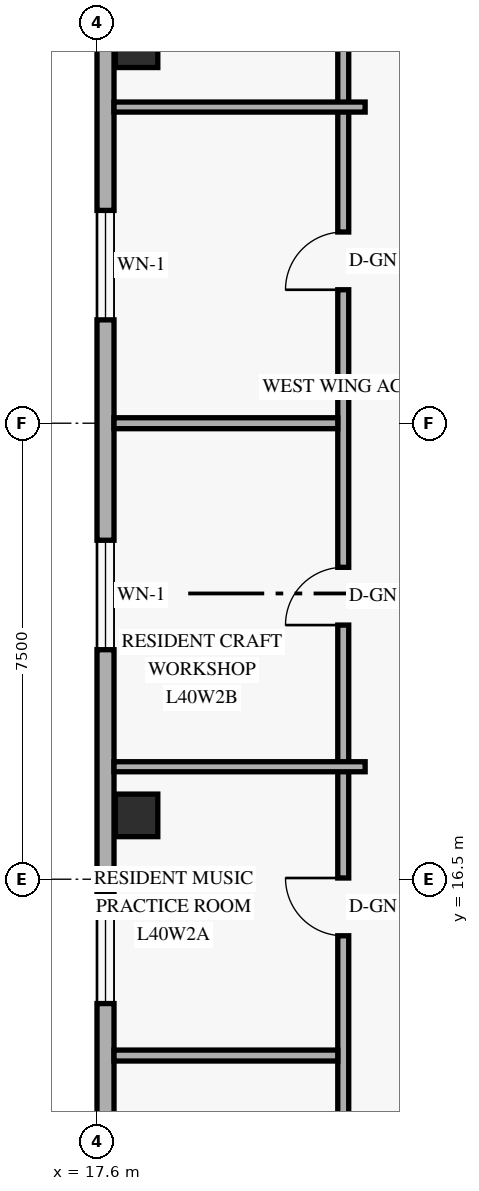
"""IFC4 building model, lengths in metres.
Left out: names, types, materials, properties, quantities, classifications, styles, units other than length and angle.
Written with IfcOpenShell. Run it as: python <this file> out.ifc"""

import sys

from ifc_helpers import new_model, si_unit, direction, frame, frame_2d, origin, origin_2d, place, context, subcontext, project, spatial, rectangle, extrude, element, fill, save


model = new_model("IFC4")
c1 = context("Model", 3, precision=1e-05, world=origin(), true_north=direction((0.0, 1.0)))
c2 = subcontext(c1, "Body", "Model", "MODEL_VIEW")
j1 = project(units=[si_unit("LENGTHUNIT", "METRE"), si_unit("PLANEANGLEUNIT", "RADIAN")], contexts=[c1])
p1 = place(None, origin())
s1 = spatial("IfcSite", under=j1, at=p1, CompositionType="ELEMENT")
p2 = place(p1, origin())
s2 = spatial("IfcBuilding", under=s1, at=p2, CompositionType="ELEMENT")
p3 = place(p2, frame((0.0, 0.0, 155.4)))
s3 = spatial("IfcBuildingStorey", under=s2, at=p3, CompositionType="ELEMENT", Elevation=155.4)
for number, where, z_axis, x_axis in (
    (1, (18.25, 17.55, 0.0), (0.0, 0.0, 1.0), (1.0, 0.0, 0.0)),
    (2, (18.25, 30.2, 0.0), (0.0, 0.0, 1.0), (1.0, 0.0, 0.0)),
):
    element("IfcColumn", number, at=place(p3, frame(where, z_axis=z_axis, x_axis=x_axis)), inside=s3, PredefinedType="COLUMN", context=c2, shape_type="SweptSolid", body=[
        extrude(rectangle(XDim=0.7, YDim=0.7, at=origin_2d()), origin(), (0.0, 0.0, 1.0), 3.6),
    ])
p4 = place(p3, frame((17.74, 40.38, 0.0), z_axis=(0.0, 0.0, 1.0), x_axis=(0.0, -1.0, 0.0)))
e3 = element("IfcWall", 3, at=p4, inside=s3, PredefinedType="SOLIDWALL", context=c2, shape_type="SweptSolid", body=[
    extrude(rectangle(XDim=32.76, YDim=0.28, at=frame_2d((16.38, 0.0))), origin(), (0.0, 0.0, 1.0), 3.36),
])
p5 = place(p4, frame((27.835, 0.0, 0.85)))
e4 = element("IfcOpeningElement", 4, at=p5, cuts=e3, PredefinedType="OPENING", context=c2, shape_type="SweptSolid", body=[
    extrude(rectangle(XDim=1.8, YDim=1.6, at=frame_2d((0.9, 0.8))), frame((0.0, 0.15, 0.0), z_axis=(0.0, -1.0, 0.0), x_axis=(1.0, 0.0, 0.0)), (0.0, 0.0, 1.0), 0.3),
])
p6 = place(p4, frame((24.125, 0.0, 0.85)))
e5 = element("IfcOpeningElement", 5, at=p6, cuts=e3, PredefinedType="OPENING", context=c2, shape_type="SweptSolid", body=[
    extrude(rectangle(XDim=1.8, YDim=1.6, at=frame_2d((0.9, 0.8))), frame((0.0, 0.15, 0.0), z_axis=(0.0, -1.0, 0.0), x_axis=(1.0, 0.0, 0.0)), (0.0, 0.0, 1.0), 0.3),
])
p7 = place(p4, frame((18.305, 0.0, 0.85)))
e6 = element("IfcOpeningElement", 6, at=p7, cuts=e3, PredefinedType="OPENING", context=c2, shape_type="SweptSolid", body=[
    extrude(rectangle(XDim=1.8, YDim=1.6, at=frame_2d((0.9, 0.8))), frame((0.0, 0.15, 0.0), z_axis=(0.0, -1.0, 0.0), x_axis=(1.0, 0.0, 0.0)), (0.0, 0.0, 1.0), 0.3),
])
p8 = place(p4, frame((12.88, 0.0, 0.85)))
e7 = element("IfcOpeningElement", 7, at=p8, cuts=e3, PredefinedType="OPENING", context=c2, shape_type="SweptSolid", body=[
    extrude(rectangle(XDim=1.8, YDim=1.6, at=frame_2d((0.9, 0.8))), frame((0.0, 0.15, 0.0), z_axis=(0.0, -1.0, 0.0), x_axis=(1.0, 0.0, 0.0)), (0.0, 0.0, 1.0), 0.3),
])
p9 = place(p4, frame((6.96, 0.0, 0.85)))
e8 = element("IfcOpeningElement", 8, at=p9, cuts=e3, PredefinedType="OPENING", context=c2, shape_type="SweptSolid", body=[
    extrude(rectangle(XDim=1.8, YDim=1.6, at=frame_2d((0.9, 0.8))), frame((0.0, 0.15, 0.0), z_axis=(0.0, -1.0, 0.0), x_axis=(1.0, 0.0, 0.0)), (0.0, 0.0, 1.0), 0.3),
])
p10 = place(p4, frame((3.125, 0.0, 0.85)))
e9 = element("IfcOpeningElement", 9, at=p10, cuts=e3, PredefinedType="OPENING", context=c2, shape_type="SweptSolid", body=[
    extrude(rectangle(XDim=1.8, YDim=1.6, at=frame_2d((0.9, 0.8))), frame((0.0, 0.15, 0.0), z_axis=(0.0, -1.0, 0.0), x_axis=(1.0, 0.0, 0.0)), (0.0, 0.0, 1.0), 0.3),
])
p11 = place(p3, frame((21.65, 6.8, 0.0), z_axis=(0.0, 0.0, 1.0), x_axis=(0.0, 1.0, 0.0)))
e10 = element("IfcWall", 10, at=p11, inside=s3, PredefinedType="STANDARD", context=c2, shape_type="SweptSolid", body=[
    extrude(rectangle(XDim=34.4, YDim=0.18, at=frame_2d((17.2, 0.0))), origin(), (0.0, 0.0, 1.0), 2.73),
])
p12 = place(p11, frame((0.3, 0.0, 0.0)))
e11 = element("IfcOpeningElement", 11, at=p12, cuts=e10, PredefinedType="OPENING", context=c2, shape_type="SweptSolid", body=[
    extrude(rectangle(XDim=0.95, YDim=2.15, at=frame_2d((0.475, 1.075))), frame((0.0, 0.1, 0.0), z_axis=(0.0, -1.0, 0.0), x_axis=(1.0, 0.0, 0.0)), (0.0, 0.0, 1.0), 0.2),
])
p13 = place(p11, frame((4.167, 0.0, 0.0)))
e12 = element("IfcOpeningElement", 12, at=p13, cuts=e10, PredefinedType="OPENING", context=c2, shape_type="SweptSolid", body=[
    extrude(rectangle(XDim=0.95, YDim=2.15, at=frame_2d((0.475, 1.075))), frame((0.0, 0.1, 0.0), z_axis=(0.0, -1.0, 0.0), x_axis=(1.0, 0.0, 0.0)), (0.0, 0.0, 1.0), 0.2),
])
p14 = place(p11, frame((8.77, 0.0, 0.0)))
e13 = element("IfcOpeningElement", 13, at=p14, cuts=e10, PredefinedType="OPENING", context=c2, shape_type="SweptSolid", body=[
    extrude(rectangle(XDim=0.95, YDim=2.15, at=frame_2d((0.475, 1.075))), frame((0.0, 0.1, 0.0), z_axis=(0.0, -1.0, 0.0), x_axis=(1.0, 0.0, 0.0)), (0.0, 0.0, 1.0), 0.2),
])
p15 = place(p11, frame((13.88, 0.0, 0.0)))
e14 = element("IfcOpeningElement", 14, at=p15, cuts=e10, PredefinedType="OPENING", context=c2, shape_type="SweptSolid", body=[
    extrude(rectangle(XDim=0.95, YDim=2.15, at=frame_2d((0.475, 1.075))), frame((0.0, 0.1, 0.0), z_axis=(0.0, -1.0, 0.0), x_axis=(1.0, 0.0, 0.0)), (0.0, 0.0, 1.0), 0.2),
])
p16 = place(p11, frame((19.395, 0.0, 0.0)))
e15 = element("IfcOpeningElement", 15, at=p16, cuts=e10, PredefinedType="OPENING", context=c2, shape_type="SweptSolid", body=[
    extrude(rectangle(XDim=0.95, YDim=2.15, at=frame_2d((0.475, 1.075))), frame((0.0, 0.1, 0.0), z_axis=(0.0, -1.0, 0.0), x_axis=(1.0, 0.0, 0.0)), (0.0, 0.0, 1.0), 0.2),
])
p17 = place(p11, frame((24.505, 0.0, 0.0)))
e16 = element("IfcOpeningElement", 16, at=p17, cuts=e10, PredefinedType="OPENING", context=c2, shape_type="SweptSolid", body=[
    extrude(rectangle(XDim=0.95, YDim=2.15, at=frame_2d((0.475, 1.075))), frame((0.0, 0.1, 0.0), z_axis=(0.0, -1.0, 0.0), x_axis=(1.0, 0.0, 0.0)), (0.0, 0.0, 1.0), 0.2),
])
p18 = place(p11, frame((29.782, 0.0, 0.0)))
e17 = element("IfcOpeningElement", 17, at=p18, cuts=e10, PredefinedType="OPENING", context=c2, shape_type="SweptSolid", body=[
    extrude(rectangle(XDim=0.95, YDim=2.15, at=frame_2d((0.475, 1.075))), frame((0.0, 0.1, 0.0), z_axis=(0.0, -1.0, 0.0), x_axis=(1.0, 0.0, 0.0)), (0.0, 0.0, 1.0), 0.2),
])
p19 = place(p11, frame((33.19, 0.0, 0.0)))
e18 = element("IfcOpeningElement", 18, at=p19, cuts=e10, PredefinedType="OPENING", context=c2, shape_type="SweptSolid", body=[
    extrude(rectangle(XDim=0.95, YDim=2.15, at=frame_2d((0.475, 1.075))), frame((0.0, 0.1, 0.0), z_axis=(0.0, -1.0, 0.0), x_axis=(1.0, 0.0, 0.0)), (0.0, 0.0, 1.0), 0.2),
])
p20 = place(p3, frame((17.88, 13.6, 0.0), z_axis=(0.0, 0.0, 1.0), x_axis=(1.0, 0.0, 0.0)))
e19 = element("IfcWall", 19, at=p20, inside=s3, PredefinedType="PARTITIONING", context=c2, shape_type="SweptSolid", body=[
    extrude(rectangle(XDim=3.68, YDim=0.18, at=frame_2d((1.84, 0.0))), origin(), (0.0, 0.0, 1.0), 2.879),
])
p21 = place(p3, frame((17.88, 18.35, 0.0), z_axis=(0.0, 0.0, 1.0), x_axis=(1.0, 0.0, 0.0)))
e20 = element("IfcWall", 20, at=p21, inside=s3, PredefinedType="PARTITIONING", context=c2, shape_type="SweptSolid", body=[
    extrude(rectangle(XDim=4.13, YDim=0.165, at=frame_2d((2.065, 0.0))), origin(), (0.0, 0.0, 1.0), 2.879),
])
p22 = place(p3, frame((17.88, 24.0, 0.0), z_axis=(0.0, 0.0, 1.0), x_axis=(1.0, 0.0, 0.0)))
e21 = element("IfcWall", 21, at=p22, inside=s3, PredefinedType="PARTITIONING", context=c2, shape_type="SweptSolid", body=[
    extrude(rectangle(XDim=3.68, YDim=0.18, at=frame_2d((1.84, 0.0))), origin(), (0.0, 0.0, 1.0), 2.879),
])
p23 = place(p3, frame((17.88, 29.2, 0.0), z_axis=(0.0, 0.0, 1.0), x_axis=(1.0, 0.0, 0.0)))
e22 = element("IfcWall", 22, at=p23, inside=s3, PredefinedType="PARTITIONING", context=c2, shape_type="SweptSolid", body=[
    extrude(rectangle(XDim=4.13, YDim=0.165, at=frame_2d((2.065, 0.0))), origin(), (0.0, 0.0, 1.0), 2.879),
])
p24 = place(p6, origin())
e23 = element("IfcWindow", 23, at=p24, inside=s3, PartitioningType="SINGLE_PANEL", PredefinedType="WINDOW", context=c2, shape_type="SweptSolid", body=[
    extrude(rectangle(XDim=1.8, YDim=1.6, at=frame_2d((0.9, 0.8))), frame((0.0, 0.03, 0.0), z_axis=(0.0, -1.0, 0.0), x_axis=(1.0, 0.0, 0.0)), (0.0, 0.0, 1.0), 0.06),
])
fill(e5, e23)
p25 = place(p7, origin())
e24 = element("IfcWindow", 24, at=p25, inside=s3, PartitioningType="SINGLE_PANEL", PredefinedType="WINDOW", context=c2, shape_type="SweptSolid", body=[
    extrude(rectangle(XDim=1.8, YDim=1.6, at=frame_2d((0.9, 0.8))), frame((0.0, 0.03, 0.0), z_axis=(0.0, -1.0, 0.0), x_axis=(1.0, 0.0, 0.0)), (0.0, 0.0, 1.0), 0.06),
])
fill(e6, e24)
p26 = place(p8, origin())
e25 = element("IfcWindow", 25, at=p26, inside=s3, PartitioningType="SINGLE_PANEL", PredefinedType="WINDOW", context=c2, shape_type="SweptSolid", body=[
    extrude(rectangle(XDim=1.8, YDim=1.6, at=frame_2d((0.9, 0.8))), frame((0.0, 0.03, 0.0), z_axis=(0.0, -1.0, 0.0), x_axis=(1.0, 0.0, 0.0)), (0.0, 0.0, 1.0), 0.06),
])
fill(e7, e25)
p27 = place(p14, origin())
e26 = element("IfcDoor", 26, at=p27, inside=s3, OperationType="SINGLE_SWING_RIGHT", PredefinedType="DOOR", context=c2, shape_type="SweptSolid", body=[
    extrude(rectangle(XDim=0.95, YDim=2.15, at=frame_2d((0.475, 1.075))), frame((0.0, 0.025, 0.0), z_axis=(0.0, -1.0, 0.0), x_axis=(1.0, 0.0, 0.0)), (0.0, 0.0, 1.0), 0.05),
])
fill(e13, e26)
p28 = place(p15, origin())
e27 = element("IfcDoor", 27, at=p28, inside=s3, OperationType="SINGLE_SWING_LEFT", PredefinedType="DOOR", context=c2, shape_type="SweptSolid", body=[
    extrude(rectangle(XDim=0.95, YDim=2.15, at=frame_2d((0.475, 1.075))), frame((0.0, 0.025, 0.0), z_axis=(0.0, -1.0, 0.0), x_axis=(1.0, 0.0, 0.0)), (0.0, 0.0, 1.0), 0.05),
])
fill(e14, e27)
p29 = place(p16, origin())
e28 = element("IfcDoor", 28, at=p29, inside=s3, OperationType="SINGLE_SWING_LEFT", PredefinedType="DOOR", context=c2, shape_type="SweptSolid", body=[
    extrude(rectangle(XDim=0.95, YDim=2.15, at=frame_2d((0.475, 1.075))), frame((0.0, 0.025, 0.0), z_axis=(0.0, -1.0, 0.0), x_axis=(1.0, 0.0, 0.0)), (0.0, 0.0, 1.0), 0.05),
])
fill(e15, e28)
save(model, sys.argv[1])
